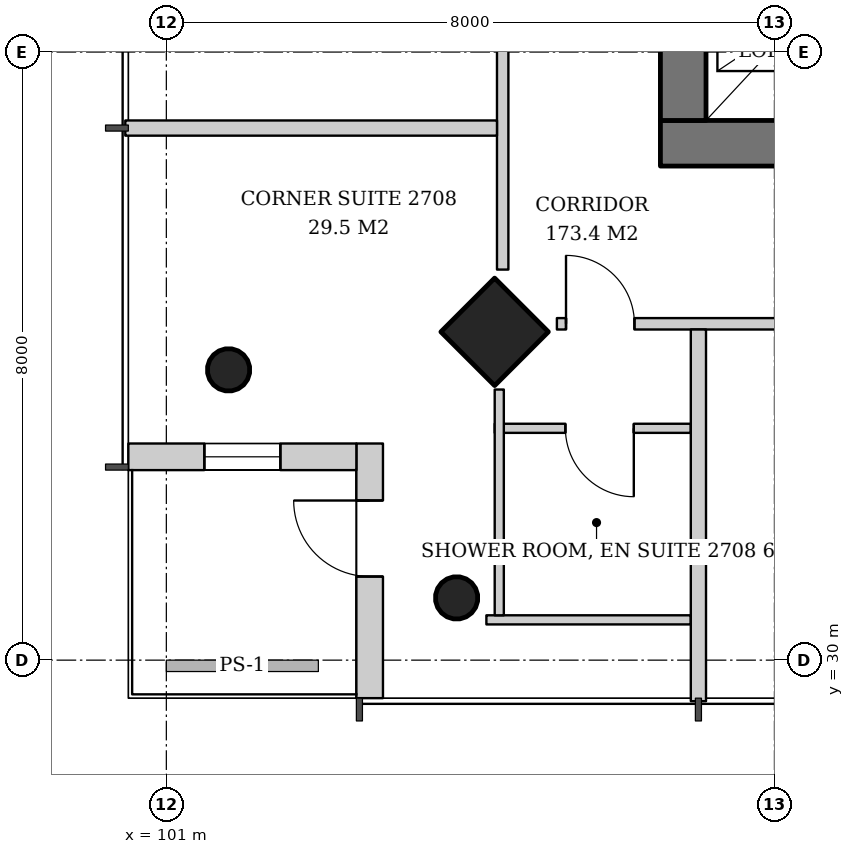
"""IFC4 building model, lengths in metres.
Left out: names, types, materials, properties, quantities, classifications, styles, units other than length and angle.
Written with IfcOpenShell. Run it as: python <this file> out.ifc"""

import sys

from ifc_helpers import new_model, si_unit, direction, frame, frame_2d, origin, origin_2d, place, context, subcontext, project, spatial, rectangle, hollow_circle, extrude, element, fill, save


model = new_model("IFC4")
c1 = context("Model", 3, precision=1e-05, world=origin(), true_north=direction((0.0, 1.0)))
c2 = subcontext(c1, "Body", "Model", "MODEL_VIEW")
j1 = project(units=[si_unit("LENGTHUNIT", "METRE"), si_unit("PLANEANGLEUNIT", "RADIAN")], contexts=[c1])
p1 = place(None, origin())
s1 = spatial("IfcSite", under=j1, at=p1, CompositionType="ELEMENT")
p2 = place(p1, origin())
s2 = spatial("IfcBuilding", under=s1, at=p2, CompositionType="ELEMENT")
p3 = place(p2, frame((0.0, 0.0, 108.4)))
s3 = spatial("IfcBuildingStorey", under=s2, at=p3, CompositionType="ELEMENT", Elevation=108.4)
p4 = place(p3, frame((105.267, 34.267, 0.0), z_axis=(0.043029647111, 0.043029647111, 0.998146732169), x_axis=(-0.707106781187, 0.707106781187, 0.0)))
e1 = element("IfcColumn", 1, at=p4, inside=s3, PredefinedType="COLUMN", context=c2, shape_type="SweptSolid", body=[
    extrude(rectangle(XDim=1.0, YDim=1.0, at=origin_2d()), origin(), (0.0, 0.0, 1.0), 3.807),
])
for number, where, z_axis, x_axis in (
    (2, (101.767, 33.767, 0.0), (0.043, 0.043, 0.998), (-0.707, 0.707, 0.0)),
    (3, (104.767, 30.767, 0.0), (0.043, 0.043, 0.998), (-0.707, 0.707, 0.0)),
):
    element("IfcColumn", number, at=place(p3, frame(where, z_axis=z_axis, x_axis=x_axis)), inside=s3, PredefinedType="COLUMN", context=c2, shape_type="SweptSolid", body=[
        extrude(hollow_circle(Radius=0.28, WallThickness=0.02, at=origin_2d()), origin(), (0.0, 0.0, 1.0), 3.807),
    ])
p5 = place(p3, frame((107.5, 36.8, 0.0), z_axis=(0.0, 0.0, 1.0), x_axis=(1.0, 0.0, 0.0)))
e4 = element("IfcWall", 4, at=p5, inside=s3, PredefinedType="SHEAR", context=c2, shape_type="SweptSolid", body=[
    extrude(rectangle(XDim=19.0, YDim=0.6, at=frame_2d((9.5, 0.0))), origin(), (0.0, 0.0, 1.0), 3.8),
])
p6 = place(p5, frame((3.9, 0.0, 0.0)))
e5 = element("IfcOpeningElement", 5, at=p6, cuts=e4, PredefinedType="OPENING", context=c2, shape_type="SweptSolid", body=[
    extrude(rectangle(XDim=1.0, YDim=2.1, at=frame_2d((0.5, 1.05))), frame((0.0, 0.31, 0.0), z_axis=(0.0, -1.0, 0.0), x_axis=(1.0, 0.0, 0.0)), (0.0, 0.0, 1.0), 0.62),
])
p7 = place(p5, frame((14.153, 0.0, 0.0)))
e6 = element("IfcOpeningElement", 6, at=p7, cuts=e4, PredefinedType="OPENING", context=c2, shape_type="SweptSolid", body=[
    extrude(rectangle(XDim=1.0, YDim=2.1, at=frame_2d((0.5, 1.05))), frame((0.0, 0.31, 0.0), z_axis=(0.0, -1.0, 0.0), x_axis=(1.0, 0.0, 0.0)), (0.0, 0.0, 1.0), 0.62),
])
p8 = place(p5, frame((15.725, 0.0, 0.0)))
e7 = element("IfcOpeningElement", 7, at=p8, cuts=e4, PredefinedType="OPENING", context=c2, shape_type="SweptSolid", body=[
    extrude(rectangle(XDim=1.0, YDim=2.1, at=frame_2d((0.5, 1.05))), frame((0.0, 0.31, 0.0), z_axis=(0.0, -1.0, 0.0), x_axis=(1.0, 0.0, 0.0)), (0.0, 0.0, 1.0), 0.62),
])
p9 = place(p5, frame((17.188, 0.0, 0.0)))
e8 = element("IfcOpeningElement", 8, at=p9, cuts=e4, PredefinedType="OPENING", context=c2, shape_type="SweptSolid", body=[
    extrude(rectangle(XDim=1.0, YDim=2.1, at=frame_2d((0.5, 1.05))), frame((0.0, 0.31, 0.0), z_axis=(0.0, -1.0, 0.0), x_axis=(1.0, 0.0, 0.0)), (0.0, 0.0, 1.0), 0.62),
])
p10 = place(p3, frame((107.8, 37.1, 0.0), z_axis=(0.0, 0.0, 1.0), x_axis=(0.0, 1.0, 0.0)))
e9 = element("IfcWall", 9, at=p10, inside=s3, PredefinedType="SHEAR", context=c2, shape_type="SweptSolid", body=[
    extrude(rectangle(XDim=17.8, YDim=0.6, at=frame_2d((8.9, 0.0))), origin(), (0.0, 0.0, 1.0), 3.8),
])
p11 = place(p10, frame((8.0, 0.0, 0.0)))
e10 = element("IfcOpeningElement", 10, at=p11, cuts=e9, PredefinedType="OPENING", context=c2, shape_type="SweptSolid", body=[
    extrude(rectangle(XDim=1.8, YDim=2.4, at=frame_2d((0.9, 1.2))), frame((0.0, 0.31, 0.0), z_axis=(0.0, -1.0, 0.0), x_axis=(1.0, 0.0, 0.0)), (0.0, 0.0, 1.0), 0.62),
])
p12 = place(p3, frame((103.675, 29.5, 0.0), z_axis=(0.0, 0.0, 1.0), x_axis=(0.0, 1.0, 0.0)))
e11 = element("IfcWall", 11, at=p12, inside=s3, PredefinedType="SOLIDWALL", context=c2, shape_type="SweptSolid", body=[
    extrude(rectangle(XDim=3.35, YDim=0.35, at=frame_2d((1.675, 0.0))), origin(), (0.0, 0.0, 1.0), 3.6),
])
p13 = place(p12, frame((1.6, 0.0, 0.0)))
e12 = element("IfcOpeningElement", 12, at=p13, cuts=e11, PredefinedType="OPENING", context=c2, shape_type="SweptSolid", body=[
    extrude(rectangle(XDim=1.0, YDim=2.4, at=frame_2d((0.5, 1.2))), frame((0.0, 0.185, 0.0), z_axis=(0.0, -1.0, 0.0), x_axis=(1.0, 0.0, 0.0)), (0.0, 0.0, 1.0), 0.37),
])
p14 = place(p3, frame((103.5, 32.675, 0.0), z_axis=(0.0, 0.0, 1.0), x_axis=(-1.0, 0.0, 0.0)))
e13 = element("IfcWall", 13, at=p14, inside=s3, PredefinedType="SOLIDWALL", context=c2, shape_type="SweptSolid", body=[
    extrude(rectangle(XDim=3.0, YDim=0.35, at=frame_2d((1.5, 0.0))), origin(), (0.0, 0.0, 1.0), 3.6),
])
p15 = place(p14, frame((1.0, 0.0, 0.9)))
e14 = element("IfcOpeningElement", 14, at=p15, cuts=e13, PredefinedType="OPENING", context=c2, shape_type="SweptSolid", body=[
    extrude(rectangle(XDim=1.0, YDim=2.4, at=frame_2d((0.5, 1.2))), frame((0.0, 0.185, 0.0), z_axis=(0.0, -1.0, 0.0), x_axis=(1.0, 0.0, 0.0)), (0.0, 0.0, 1.0), 0.37),
])
p16 = place(p3, frame((105.425, 56.862, 0.0), z_axis=(0.0, 0.0, 1.0), x_axis=(0.0, -1.0, 0.0)))
e15 = element("IfcWall", 15, at=p16, inside=s3, PredefinedType="PARTITIONING", context=c2, shape_type="SweptSolid", body=[
    extrude(rectangle(XDim=21.724, YDim=0.15, at=frame_2d((10.862, 0.0))), origin(), (0.0, 0.0, 1.0), 2.9),
])
p17 = place(p16, frame((0.12, 0.0, 0.0)))
e16 = element("IfcOpeningElement", 16, at=p17, cuts=e15, PredefinedType="OPENING", context=c2, shape_type="SweptSolid", body=[
    extrude(rectangle(XDim=0.9, YDim=2.1, at=frame_2d((0.45, 1.05))), frame((0.0, 0.085, 0.0), z_axis=(0.0, -1.0, 0.0), x_axis=(1.0, 0.0, 0.0)), (0.0, 0.0, 1.0), 0.17),
])
p18 = place(p16, frame((4.612, 0.0, 0.0)))
e17 = element("IfcOpeningElement", 17, at=p18, cuts=e15, PredefinedType="OPENING", context=c2, shape_type="SweptSolid", body=[
    extrude(rectangle(XDim=0.9, YDim=2.1, at=frame_2d((0.45, 1.05))), frame((0.0, 0.085, 0.0), z_axis=(0.0, -1.0, 0.0), x_axis=(1.0, 0.0, 0.0)), (0.0, 0.0, 1.0), 0.17),
])
p19 = place(p16, frame((13.612, 0.0, 0.0)))
e18 = element("IfcOpeningElement", 18, at=p19, cuts=e15, PredefinedType="OPENING", context=c2, shape_type="SweptSolid", body=[
    extrude(rectangle(XDim=0.9, YDim=2.1, at=frame_2d((0.45, 1.05))), frame((0.0, 0.085, 0.0), z_axis=(0.0, -1.0, 0.0), x_axis=(1.0, 0.0, 0.0)), (0.0, 0.0, 1.0), 0.17),
])
p20 = place(p3, frame((105.35, 37.0, 0.0), z_axis=(0.0, 0.0, 1.0), x_axis=(-1.0, 0.0, 0.0)))
e19 = element("IfcWall", 19, at=p20, inside=s3, PredefinedType="PARTITIONING", context=c2, shape_type="SweptSolid", body=[
    extrude(rectangle(XDim=4.89, YDim=0.2, at=frame_2d((2.445, 0.0))), origin(), (0.0, 0.0, 1.0), 3.2),
])
p21 = place(p3, frame((107.9, 33.05, 0.0), z_axis=(0.0, 0.0, 1.0), x_axis=(-1.0, 0.0, 0.0)))
e20 = element("IfcWall", 20, at=p21, inside=s3, PredefinedType="PARTITIONING", context=c2, shape_type="SweptSolid", body=[
    extrude(rectangle(XDim=2.58, YDim=0.12, at=frame_2d((1.29, 0.0))), origin(), (0.0, 0.0, 1.0), 2.9),
])
p22 = place(p21, frame((0.75, 0.0, 0.0)))
e21 = element("IfcOpeningElement", 21, at=p22, cuts=e20, PredefinedType="OPENING", context=c2, shape_type="SweptSolid", body=[
    extrude(rectangle(XDim=0.9, YDim=2.1, at=frame_2d((0.45, 1.05))), frame((0.0, 0.07, 0.0), z_axis=(0.0, -1.0, 0.0), x_axis=(1.0, 0.0, 0.0)), (0.0, 0.0, 1.0), 0.14),
])
p23 = place(p3, frame((107.9, 30.53, 0.0), z_axis=(0.0, 0.0, 1.0), x_axis=(-1.0, 0.0, 0.0)))
e22 = element("IfcWall", 22, at=p23, inside=s3, PredefinedType="PARTITIONING", context=c2, shape_type="SweptSolid", body=[
    extrude(rectangle(XDim=2.689, YDim=0.12, at=frame_2d((1.345, 0.0))), origin(), (0.0, 0.0, 1.0), 3.6),
])
p24 = place(p3, frame((105.38, 33.56, 0.0), z_axis=(0.0, 0.0, 1.0), x_axis=(0.0, -1.0, 0.0)))
e23 = element("IfcWall", 23, at=p24, inside=s3, PredefinedType="PARTITIONING", context=c2, shape_type="SweptSolid", body=[
    extrude(rectangle(XDim=2.97, YDim=0.12, at=frame_2d((1.485, 0.0))), origin(), (0.0, 0.0, 1.0), 3.2),
])
p25 = place(p3, frame((106.138, 34.425, 0.0), z_axis=(0.0, 0.0, 1.0), x_axis=(1.0, 0.0, 0.0)))
e24 = element("IfcWall", 24, at=p25, inside=s3, PredefinedType="PARTITIONING", context=c2, shape_type="SweptSolid", body=[
    extrude(rectangle(XDim=21.724, YDim=0.15, at=frame_2d((10.862, 0.0))), origin(), (0.0, 0.0, 1.0), 2.9),
])
p26 = place(p25, frame((0.12, 0.0, 0.0)))
e25 = element("IfcOpeningElement", 25, at=p26, cuts=e24, PredefinedType="OPENING", context=c2, shape_type="SweptSolid", body=[
    extrude(rectangle(XDim=0.9, YDim=2.1, at=frame_2d((0.45, 1.05))), frame((0.0, 0.085, 0.0), z_axis=(0.0, -1.0, 0.0), x_axis=(1.0, 0.0, 0.0)), (0.0, 0.0, 1.0), 0.17),
])
p27 = place(p25, frame((4.562, 0.0, 0.0)))
e26 = element("IfcOpeningElement", 26, at=p27, cuts=e24, PredefinedType="OPENING", context=c2, shape_type="SweptSolid", body=[
    extrude(rectangle(XDim=1.0, YDim=2.1, at=frame_2d((0.5, 1.05))), frame((0.0, 0.085, 0.0), z_axis=(0.0, -1.0, 0.0), x_axis=(1.0, 0.0, 0.0)), (0.0, 0.0, 1.0), 0.17),
])
p28 = place(p25, frame((13.612, 0.0, 0.0)))
e27 = element("IfcOpeningElement", 27, at=p28, cuts=e24, PredefinedType="OPENING", context=c2, shape_type="SweptSolid", body=[
    extrude(rectangle(XDim=0.9, YDim=2.1, at=frame_2d((0.45, 1.05))), frame((0.0, 0.085, 0.0), z_axis=(0.0, -1.0, 0.0), x_axis=(1.0, 0.0, 0.0)), (0.0, 0.0, 1.0), 0.17),
])
p29 = place(p3, frame((108.0, 34.35, 0.0), z_axis=(0.0, 0.0, 1.0), x_axis=(0.0, -1.0, 0.0)))
e28 = element("IfcWall", 28, at=p29, inside=s3, PredefinedType="PARTITIONING", context=c2, shape_type="SweptSolid", body=[
    extrude(rectangle(XDim=4.89, YDim=0.2, at=frame_2d((2.445, 0.0))), origin(), (0.0, 0.0, 1.0), 2.9),
])
p30 = place(p13, origin())
e29 = element("IfcDoor", 29, at=p30, inside=s3, OperationType="SINGLE_SWING_RIGHT", PredefinedType="DOOR", context=c2, shape_type="SweptSolid", body=[
    extrude(rectangle(XDim=1.0, YDim=2.4, at=frame_2d((0.5, 1.2))), frame((0.0, 0.025, 0.0), z_axis=(0.0, -1.0, 0.0), x_axis=(1.0, 0.0, 0.0)), (0.0, 0.0, 1.0), 0.05),
])
fill(e12, e29)
p31 = place(p15, origin())
e30 = element("IfcWindow", 30, at=p31, inside=s3, PartitioningType="SINGLE_PANEL", PredefinedType="WINDOW", context=c2, shape_type="SweptSolid", body=[
    extrude(rectangle(XDim=1.0, YDim=2.4, at=frame_2d((0.5, 1.2))), frame((0.0, 0.03, 0.0), z_axis=(0.0, -1.0, 0.0), x_axis=(1.0, 0.0, 0.0)), (0.0, 0.0, 1.0), 0.06),
])
fill(e14, e30)
p32 = place(p22, origin())
e31 = element("IfcDoor", 31, at=p32, inside=s3, OperationType="SINGLE_SWING_LEFT", PredefinedType="DOOR", context=c2, shape_type="SweptSolid", body=[
    extrude(rectangle(XDim=0.9, YDim=2.1, at=frame_2d((0.45, 1.05))), frame((0.0, 0.025, 0.0), z_axis=(0.0, -1.0, 0.0), x_axis=(1.0, 0.0, 0.0)), (0.0, 0.0, 1.0), 0.05),
])
fill(e21, e31)
p33 = place(p26, origin())
e32 = element("IfcDoor", 32, at=p33, inside=s3, OperationType="SINGLE_SWING_LEFT", PredefinedType="DOOR", context=c2, shape_type="SweptSolid", body=[
    extrude(rectangle(XDim=0.9, YDim=2.1, at=frame_2d((0.45, 1.05))), frame((0.0, 0.025, 0.0), z_axis=(0.0, -1.0, 0.0), x_axis=(1.0, 0.0, 0.0)), (0.0, 0.0, 1.0), 0.05),
])
fill(e25, e32)
save(model, sys.argv[1])
